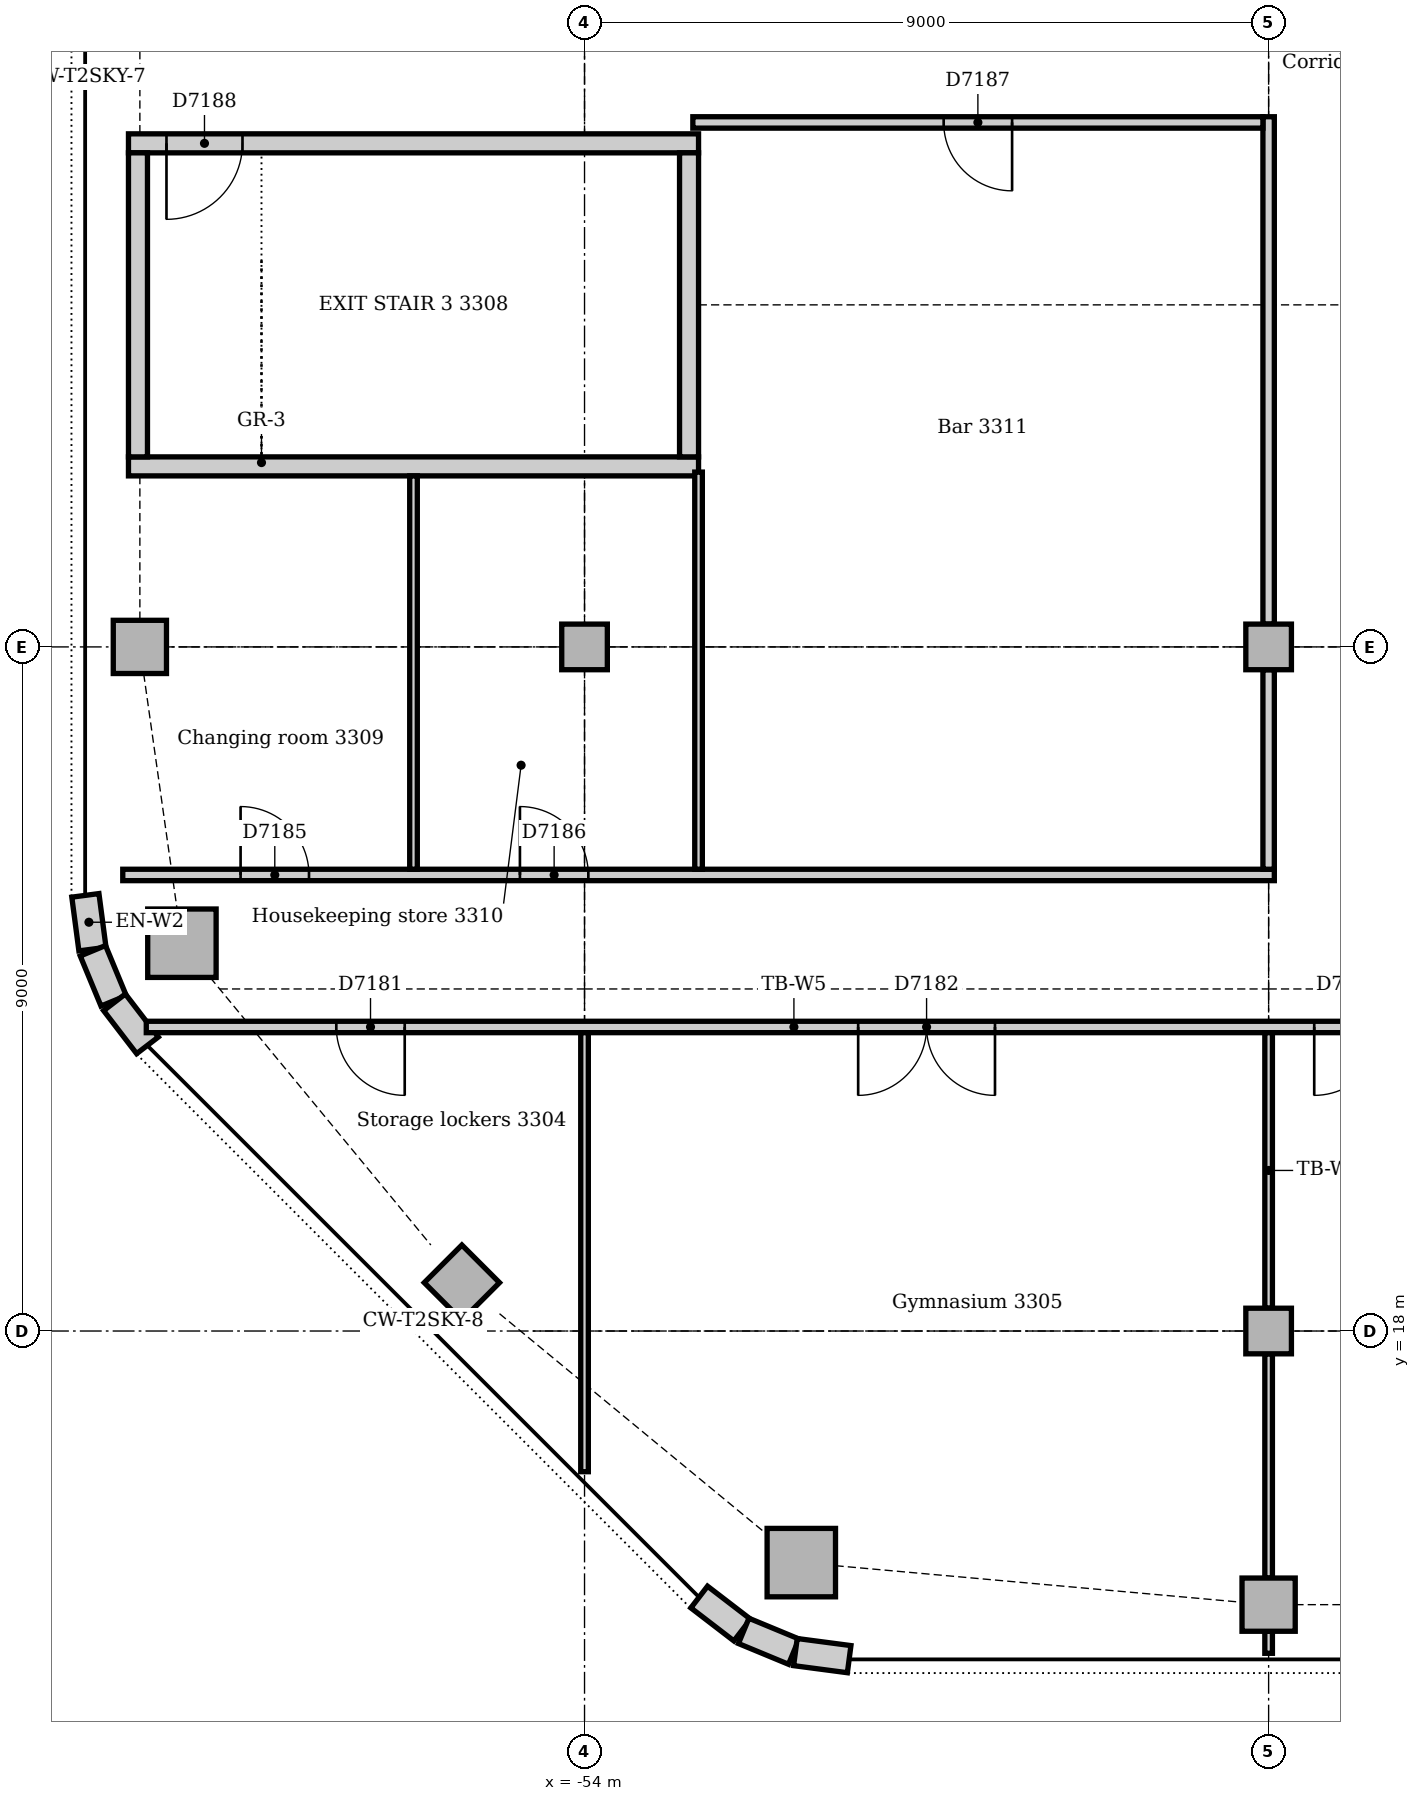
"""IFC4 building model, lengths in metres.
Left out: names, types, materials, properties, quantities, classifications, styles, units other than length and angle.
Written with IfcOpenShell. Run it as: python <this file> out.ifc"""

import sys

from ifc_helpers import new_model, si_unit, direction, frame, frame_2d, origin, origin_2d, place, context, subcontext, project, spatial, rectangle, extrude, element, fill, save


model = new_model("IFC4")
c1 = context("Model", 3, precision=1e-05, world=origin(), true_north=direction((0.0, 1.0)))
c2 = subcontext(c1, "Body", "Model", "MODEL_VIEW")
j1 = project(units=[si_unit("LENGTHUNIT", "METRE"), si_unit("PLANEANGLEUNIT", "RADIAN")], contexts=[c1])
p1 = place(None, origin())
s1 = spatial("IfcSite", under=j1, at=p1, CompositionType="ELEMENT")
p2 = place(p1, origin())
s2 = spatial("IfcBuilding", under=s1, at=p2, CompositionType="ELEMENT")
p3 = place(p2, frame((0.0, 0.0, 140.0)))
s3 = spatial("IfcBuildingStorey", under=s2, at=p3, CompositionType="ELEMENT", Elevation=140.0)
p4 = place(p3, frame((-60.0, 29.375, 0.0), z_axis=(0.0, 0.0, 1.0), x_axis=(1.0, 0.0, 0.0)))
e1 = element("IfcWall", 1, at=p4, inside=s3, PredefinedType="SOLIDWALL", context=c2, shape_type="SweptSolid", body=[
    extrude(rectangle(XDim=7.5, YDim=0.25, at=frame_2d((3.75, 0.0))), origin(), (0.0, 0.0, 1.0), 3.7),
])
p5 = place(p3, frame((-52.5, 33.625, 0.0), z_axis=(0.0, 0.0, 1.0), x_axis=(-1.0, 0.0, 0.0)))
e2 = element("IfcWall", 2, at=p5, inside=s3, PredefinedType="SOLIDWALL", context=c2, shape_type="SweptSolid", body=[
    extrude(rectangle(XDim=7.5, YDim=0.25, at=frame_2d((3.75, 0.0))), origin(), (0.0, 0.0, 1.0), 3.7),
])
p6 = place(p5, frame((6.0, 0.0, 0.0)))
e3 = element("IfcOpeningElement", 3, at=p6, cuts=e2, PredefinedType="OPENING", context=c2, shape_type="SweptSolid", body=[
    extrude(rectangle(XDim=1.0, YDim=2.1, at=frame_2d((0.5, 1.05))), frame((0.0, 0.135, 0.0), z_axis=(0.0, -1.0, 0.0), x_axis=(1.0, 0.0, 0.0)), (0.0, 0.0, 1.0), 0.27),
])
for number, where, z_axis, x_axis in (
    (4, (-52.625, 29.5, 0.0), (0.0, 0.0, 1.0), (0.0, 1.0, 0.0)),
    (5, (-59.875, 33.5, 0.0), (0.0, 0.0, 1.0), (0.0, -1.0, 0.0)),
):
    element("IfcWall", number, at=place(p3, frame(where, z_axis=z_axis, x_axis=x_axis)), inside=s3, PredefinedType="SOLIDWALL", context=c2, shape_type="SweptSolid", body=[
        extrude(rectangle(XDim=4.0, YDim=0.25, at=frame_2d((2.0, 0.0))), origin(), (0.0, 0.0, 1.0), 3.7),
    ])
for number, where, z_axis, x_axis in (
    (6, (-51.148, 14.953, 0.0), (0.0, 0.0, 1.0), (1.0, 0.0, 0.0)),
    (7, (-59.297, 23.102, 0.0), (0.0, 0.0, 1.0), (1.0, 0.0, 0.0)),
):
    element("IfcColumn", number, at=place(p3, frame(where, z_axis=z_axis, x_axis=x_axis)), inside=s3, PredefinedType="COLUMN", context=c2, shape_type="SweptSolid", body=[
        extrude(rectangle(XDim=0.9, YDim=0.9, at=origin_2d()), origin(), (0.0, 0.0, 1.0), 3.7),
    ])
for number, where, z_axis, x_axis in (
    (8, (-45.0, 14.4, 0.0), (0.0, 0.0, 1.0), (1.0, 0.0, 0.0)),
    (9, (-59.85, 27.0, 0.0), (0.0, 0.0, 1.0), (1.0, 0.0, 0.0)),
    (10, (-55.614, 18.636, 0.0), (0.0, 0.0, 1.0), (0.707, 0.707, 0.0)),
):
    element("IfcColumn", number, at=place(p3, frame(where, z_axis=z_axis, x_axis=x_axis)), inside=s3, PredefinedType="COLUMN", context=c2, shape_type="SweptSolid", body=[
        extrude(rectangle(XDim=0.7, YDim=0.7, at=origin_2d()), origin(), (0.0, 0.0, 1.0), 3.7),
    ])
for number, where, z_axis, x_axis in (
    (11, (-54.0, 27.0, 0.0), (0.0, 0.0, 1.0), (1.0, 0.0, 0.0)),
    (12, (-45.0, 18.0, 0.0), (0.0, 0.0, 1.0), (1.0, 0.0, 0.0)),
    (13, (-45.0, 27.0, 0.0), (0.0, 0.0, 1.0), (1.0, 0.0, 0.0)),
):
    element("IfcColumn", number, at=place(p3, frame(where, z_axis=z_axis, x_axis=x_axis)), inside=s3, PredefinedType="COLUMN", context=c2, shape_type="SweptSolid", body=[
        extrude(rectangle(XDim=0.6, YDim=0.6, at=origin_2d()), origin(), (0.0, 0.0, 1.0), 3.7),
    ])
for number, where, z_axis, x_axis in (
    (14, (-60.567, 23.731, 0.0), (0.0, 0.0, 1.0), (0.131, -0.991, 0.0)),
    (15, (-60.468, 23.003, 0.0), (0.0, 0.0, 1.0), (0.383, -0.924, 0.0)),
):
    element("IfcWall", number, at=place(p3, frame(where, z_axis=z_axis, x_axis=x_axis)), inside=s3, PredefinedType="STANDARD", context=c2, shape_type="SweptSolid", body=[
        extrude(rectangle(XDim=0.713, YDim=0.36, at=frame_2d((0.356, 0.0))), origin(), (0.0, 0.0, 1.0), 3.7),
    ])
for number, where, z_axis, x_axis in (
    (16, (-60.184, 22.325, 0.0), (0.0, 0.0, 1.0), (0.609, -0.793, 0.0)),
    (17, (-52.491, 14.5, 0.0), (0.0, 0.0, 1.0), (0.793, -0.609, 0.0)),
):
    element("IfcWall", number, at=place(p3, frame(where, z_axis=z_axis, x_axis=x_axis)), inside=s3, PredefinedType="STANDARD", context=c2, shape_type="SweptSolid", body=[
        extrude(rectangle(XDim=0.713, YDim=0.36, at=frame_2d((0.357, 0.0))), origin(), (0.0, 0.0, 1.0), 3.7),
    ])
for number, where, z_axis, x_axis in (
    (18, (-51.906, 14.055, 0.0), (0.0, 0.0, 1.0), (0.924, -0.383, 0.0)),
    (19, (-51.226, 13.776, 0.0), (0.0, 0.0, 1.0), (0.991, -0.131, 0.0)),
):
    element("IfcWall", number, at=place(p3, frame(where, z_axis=z_axis, x_axis=x_axis)), inside=s3, PredefinedType="STANDARD", context=c2, shape_type="SweptSolid", body=[
        extrude(rectangle(XDim=0.713, YDim=0.36, at=frame_2d((0.356, 0.0))), origin(), (0.0, 0.0, 1.0), 3.7),
    ])
p7 = place(p3, frame((-59.766, 22.0, 0.0), z_axis=(0.0, 0.0, 1.0), x_axis=(1.0, 0.0, 0.0)))
e20 = element("IfcWall", 20, at=p7, inside=s3, PredefinedType="PARTITIONING", context=c2, shape_type="SweptSolid", body=[
    extrude(rectangle(XDim=17.041, YDim=0.15, at=frame_2d((8.52, 0.0))), origin(), (0.0, 0.0, 1.0), 3.55),
])
p8 = place(p7, frame((15.366, 0.0, 0.0)))
e21 = element("IfcOpeningElement", 21, at=p8, cuts=e20, PredefinedType="OPENING", context=c2, shape_type="SweptSolid", body=[
    extrude(rectangle(XDim=0.9, YDim=2.1, at=frame_2d((0.45, 1.05))), frame((0.0, 0.085, 0.0), z_axis=(0.0, -1.0, 0.0), x_axis=(1.0, 0.0, 0.0)), (0.0, 0.0, 1.0), 0.17),
])
p9 = place(p7, frame((2.5, 0.0, 0.0)))
e22 = element("IfcOpeningElement", 22, at=p9, cuts=e20, PredefinedType="OPENING", context=c2, shape_type="SweptSolid", body=[
    extrude(rectangle(XDim=0.9, YDim=2.1, at=frame_2d((0.45, 1.05))), frame((0.0, 0.085, 0.0), z_axis=(0.0, -1.0, 0.0), x_axis=(1.0, 0.0, 0.0)), (0.0, 0.0, 1.0), 0.17),
])
p10 = place(p7, frame((9.366, 0.0, 0.0)))
e23 = element("IfcOpeningElement", 23, at=p10, cuts=e20, PredefinedType="OPENING", context=c2, shape_type="SweptSolid", body=[
    extrude(rectangle(XDim=1.8, YDim=2.1, at=frame_2d((0.9, 1.05))), frame((0.0, 0.085, 0.0), z_axis=(0.0, -1.0, 0.0), x_axis=(1.0, 0.0, 0.0)), (0.0, 0.0, 1.0), 0.17),
])
p11 = place(p3, frame((-60.075, 24.0, 0.0), z_axis=(0.0, 0.0, 1.0), x_axis=(1.0, 0.0, 0.0)))
e24 = element("IfcWall", 24, at=p11, inside=s3, PredefinedType="PARTITIONING", context=c2, shape_type="SweptSolid", body=[
    extrude(rectangle(XDim=15.15, YDim=0.15, at=frame_2d((7.575, 0.0))), origin(), (0.0, 0.0, 1.0), 3.55),
])
p12 = place(p11, frame((1.55, 0.0, 0.0)))
e25 = element("IfcOpeningElement", 25, at=p12, cuts=e24, PredefinedType="OPENING", context=c2, shape_type="SweptSolid", body=[
    extrude(rectangle(XDim=0.9, YDim=2.1, at=frame_2d((0.45, 1.05))), frame((0.0, 0.085, 0.0), z_axis=(0.0, -1.0, 0.0), x_axis=(1.0, 0.0, 0.0)), (0.0, 0.0, 1.0), 0.17),
])
p13 = place(p11, frame((5.225, 0.0, 0.0)))
e26 = element("IfcOpeningElement", 26, at=p13, cuts=e24, PredefinedType="OPENING", context=c2, shape_type="SweptSolid", body=[
    extrude(rectangle(XDim=0.9, YDim=2.1, at=frame_2d((0.45, 1.05))), frame((0.0, 0.085, 0.0), z_axis=(0.0, -1.0, 0.0), x_axis=(1.0, 0.0, 0.0)), (0.0, 0.0, 1.0), 0.17),
])
p14 = place(p3, frame((-45.0, 24.075, 0.0), z_axis=(0.0, 0.0, 1.0), x_axis=(0.0, 1.0, 0.0)))
e27 = element("IfcWall", 27, at=p14, inside=s3, PredefinedType="PARTITIONING", context=c2, shape_type="SweptSolid", body=[
    extrude(rectangle(XDim=2.625, YDim=0.15, at=frame_2d((1.312, 0.0))), origin(), (0.0, 0.0, 1.0), 3.062),
])
p15 = place(p3, frame((-45.0, 27.3, 0.0), z_axis=(0.0, 0.0, 1.0), x_axis=(0.0, 1.0, 0.0)))
e28 = element("IfcWall", 28, at=p15, inside=s3, PredefinedType="PARTITIONING", context=c2, shape_type="SweptSolid", body=[
    extrude(rectangle(XDim=6.675, YDim=0.15, at=frame_2d((3.337, 0.0))), origin(), (0.0, 0.0, 1.0), 3.062),
])
p16 = place(p3, frame((-52.575, 33.9, 0.0), z_axis=(0.0, 0.0, 1.0), x_axis=(1.0, 0.0, 0.0)))
e29 = element("IfcWall", 29, at=p16, inside=s3, PredefinedType="PARTITIONING", context=c2, shape_type="SweptSolid", body=[
    extrude(rectangle(XDim=7.5, YDim=0.15, at=frame_2d((3.75, 0.0))), origin(), (0.0, 0.0, 1.0), 3.55),
])
p17 = place(p16, frame((3.3, 0.0, 0.0)))
e30 = element("IfcOpeningElement", 30, at=p17, cuts=e29, PredefinedType="OPENING", context=c2, shape_type="SweptSolid", body=[
    extrude(rectangle(XDim=0.9, YDim=2.1, at=frame_2d((0.45, 1.05))), frame((0.0, 0.085, 0.0), z_axis=(0.0, -1.0, 0.0), x_axis=(1.0, 0.0, 0.0)), (0.0, 0.0, 1.0), 0.17),
])
p18 = place(p3, frame((-45.0, 18.3, 0.0), z_axis=(0.0, 0.0, 1.0), x_axis=(0.0, 1.0, 0.0)))
e31 = element("IfcWall", 31, at=p18, inside=s3, PredefinedType="PARTITIONING", context=c2, shape_type="SweptSolid", body=[
    extrude(rectangle(XDim=3.625, YDim=0.1, at=frame_2d((1.812, 0.0))), origin(), (0.0, 0.0, 1.0), 3.062),
])
p19 = place(p3, frame((-45.0, 14.75, 0.0), z_axis=(0.0, 0.0, 1.0), x_axis=(0.0, 1.0, 0.0)))
e32 = element("IfcWall", 32, at=p19, inside=s3, PredefinedType="PARTITIONING", context=c2, shape_type="SweptSolid", body=[
    extrude(rectangle(XDim=2.95, YDim=0.1, at=frame_2d((1.475, 0.0))), origin(), (0.0, 0.0, 1.0), 3.352),
])
p20 = place(p3, frame((-45.0, 13.76, 0.0), z_axis=(0.0, 0.0, 1.0), x_axis=(0.0, 1.0, 0.0)))
e33 = element("IfcWall", 33, at=p20, inside=s3, PredefinedType="PARTITIONING", context=c2, shape_type="SweptSolid", body=[
    extrude(rectangle(XDim=0.29, YDim=0.1, at=frame_2d((0.145, 0.0))), origin(), (0.0, 0.0, 1.0), 3.55),
])
p21 = place(p3, frame((-54.0, 16.149, 0.0), z_axis=(0.0, 0.0, 1.0), x_axis=(0.0, 1.0, 0.0)))
e34 = element("IfcWall", 34, at=p21, inside=s3, PredefinedType="PARTITIONING", context=c2, shape_type="SweptSolid", body=[
    extrude(rectangle(XDim=5.776, YDim=0.1, at=frame_2d((2.888, 0.0))), origin(), (0.0, 0.0, 1.0), 3.062),
])
p22 = place(p3, frame((-56.25, 24.075, 0.0), z_axis=(0.0, 0.0, 1.0), x_axis=(0.0, 1.0, 0.0)))
e35 = element("IfcWall", 35, at=p22, inside=s3, PredefinedType="PARTITIONING", context=c2, shape_type="SweptSolid", body=[
    extrude(rectangle(XDim=5.175, YDim=0.1, at=frame_2d((2.587, 0.0))), origin(), (0.0, 0.0, 1.0), 3.55),
])
p23 = place(p3, frame((-52.5, 24.075, 0.0), z_axis=(0.0, 0.0, 1.0), x_axis=(0.0, 1.0, 0.0)))
e36 = element("IfcWall", 36, at=p23, inside=s3, PredefinedType="PARTITIONING", context=c2, shape_type="SweptSolid", body=[
    extrude(rectangle(XDim=5.225, YDim=0.1, at=frame_2d((2.612, 0.0))), origin(), (0.0, 0.0, 1.0), 3.55),
])
p24 = place(p8, frame((0.9, 0.0, 0.0), z_axis=(0.0, 0.0, 1.0), x_axis=(-1.0, 0.0, 0.0)))
e37 = element("IfcDoor", 37, at=p24, inside=s3, OperationType="SINGLE_SWING_RIGHT", PredefinedType="DOOR", context=c2, shape_type="SweptSolid", body=[
    extrude(rectangle(XDim=0.9, YDim=2.1, at=frame_2d((0.45, 1.05))), frame((0.0, 0.025, 0.0), z_axis=(0.0, -1.0, 0.0), x_axis=(1.0, 0.0, 0.0)), (0.0, 0.0, 1.0), 0.05),
])
fill(e21, e37)
p25 = place(p9, frame((0.9, 0.0, 0.0), z_axis=(0.0, 0.0, 1.0), x_axis=(-1.0, 0.0, 0.0)))
e38 = element("IfcDoor", 38, at=p25, inside=s3, OperationType="SINGLE_SWING_LEFT", PredefinedType="DOOR", context=c2, shape_type="SweptSolid", body=[
    extrude(rectangle(XDim=0.9, YDim=2.1, at=frame_2d((0.45, 1.05))), frame((0.0, 0.025, 0.0), z_axis=(0.0, -1.0, 0.0), x_axis=(1.0, 0.0, 0.0)), (0.0, 0.0, 1.0), 0.05),
])
fill(e22, e38)
p26 = place(p10, frame((1.8, 0.0, 0.0), z_axis=(0.0, 0.0, 1.0), x_axis=(-1.0, 0.0, 0.0)))
e39 = element("IfcDoor", 39, at=p26, inside=s3, OperationType="DOUBLE_DOOR_DOUBLE_SWING", PredefinedType="DOOR", context=c2, shape_type="SweptSolid", body=[
    extrude(rectangle(XDim=1.8, YDim=2.1, at=frame_2d((0.9, 1.05))), frame((0.0, 0.025, 0.0), z_axis=(0.0, -1.0, 0.0), x_axis=(1.0, 0.0, 0.0)), (0.0, 0.0, 1.0), 0.05),
])
fill(e23, e39)
p27 = place(p12, origin())
e40 = element("IfcDoor", 40, at=p27, inside=s3, OperationType="SINGLE_SWING_LEFT", PredefinedType="DOOR", context=c2, shape_type="SweptSolid", body=[
    extrude(rectangle(XDim=0.9, YDim=2.1, at=frame_2d((0.45, 1.05))), frame((0.0, 0.025, 0.0), z_axis=(0.0, -1.0, 0.0), x_axis=(1.0, 0.0, 0.0)), (0.0, 0.0, 1.0), 0.05),
])
fill(e25, e40)
p28 = place(p13, origin())
e41 = element("IfcDoor", 41, at=p28, inside=s3, OperationType="SINGLE_SWING_LEFT", PredefinedType="DOOR", context=c2, shape_type="SweptSolid", body=[
    extrude(rectangle(XDim=0.9, YDim=2.1, at=frame_2d((0.45, 1.05))), frame((0.0, 0.025, 0.0), z_axis=(0.0, -1.0, 0.0), x_axis=(1.0, 0.0, 0.0)), (0.0, 0.0, 1.0), 0.05),
])
fill(e26, e41)
p29 = place(p17, frame((0.9, 0.0, 0.0), z_axis=(0.0, 0.0, 1.0), x_axis=(-1.0, 0.0, 0.0)))
e42 = element("IfcDoor", 42, at=p29, inside=s3, OperationType="SINGLE_SWING_LEFT", PredefinedType="DOOR", context=c2, shape_type="SweptSolid", body=[
    extrude(rectangle(XDim=0.9, YDim=2.1, at=frame_2d((0.45, 1.05))), frame((0.0, 0.025, 0.0), z_axis=(0.0, -1.0, 0.0), x_axis=(1.0, 0.0, 0.0)), (0.0, 0.0, 1.0), 0.05),
])
fill(e30, e42)
p30 = place(p6, origin())
e43 = element("IfcDoor", 43, at=p30, inside=s3, OperationType="SINGLE_SWING_RIGHT", PredefinedType="DOOR", context=c2, shape_type="SweptSolid", body=[
    extrude(rectangle(XDim=1.0, YDim=2.1, at=frame_2d((0.5, 1.05))), frame((0.0, 0.025, 0.0), z_axis=(0.0, -1.0, 0.0), x_axis=(1.0, 0.0, 0.0)), (0.0, 0.0, 1.0), 0.05),
])
fill(e3, e43)
save(model, sys.argv[1])
